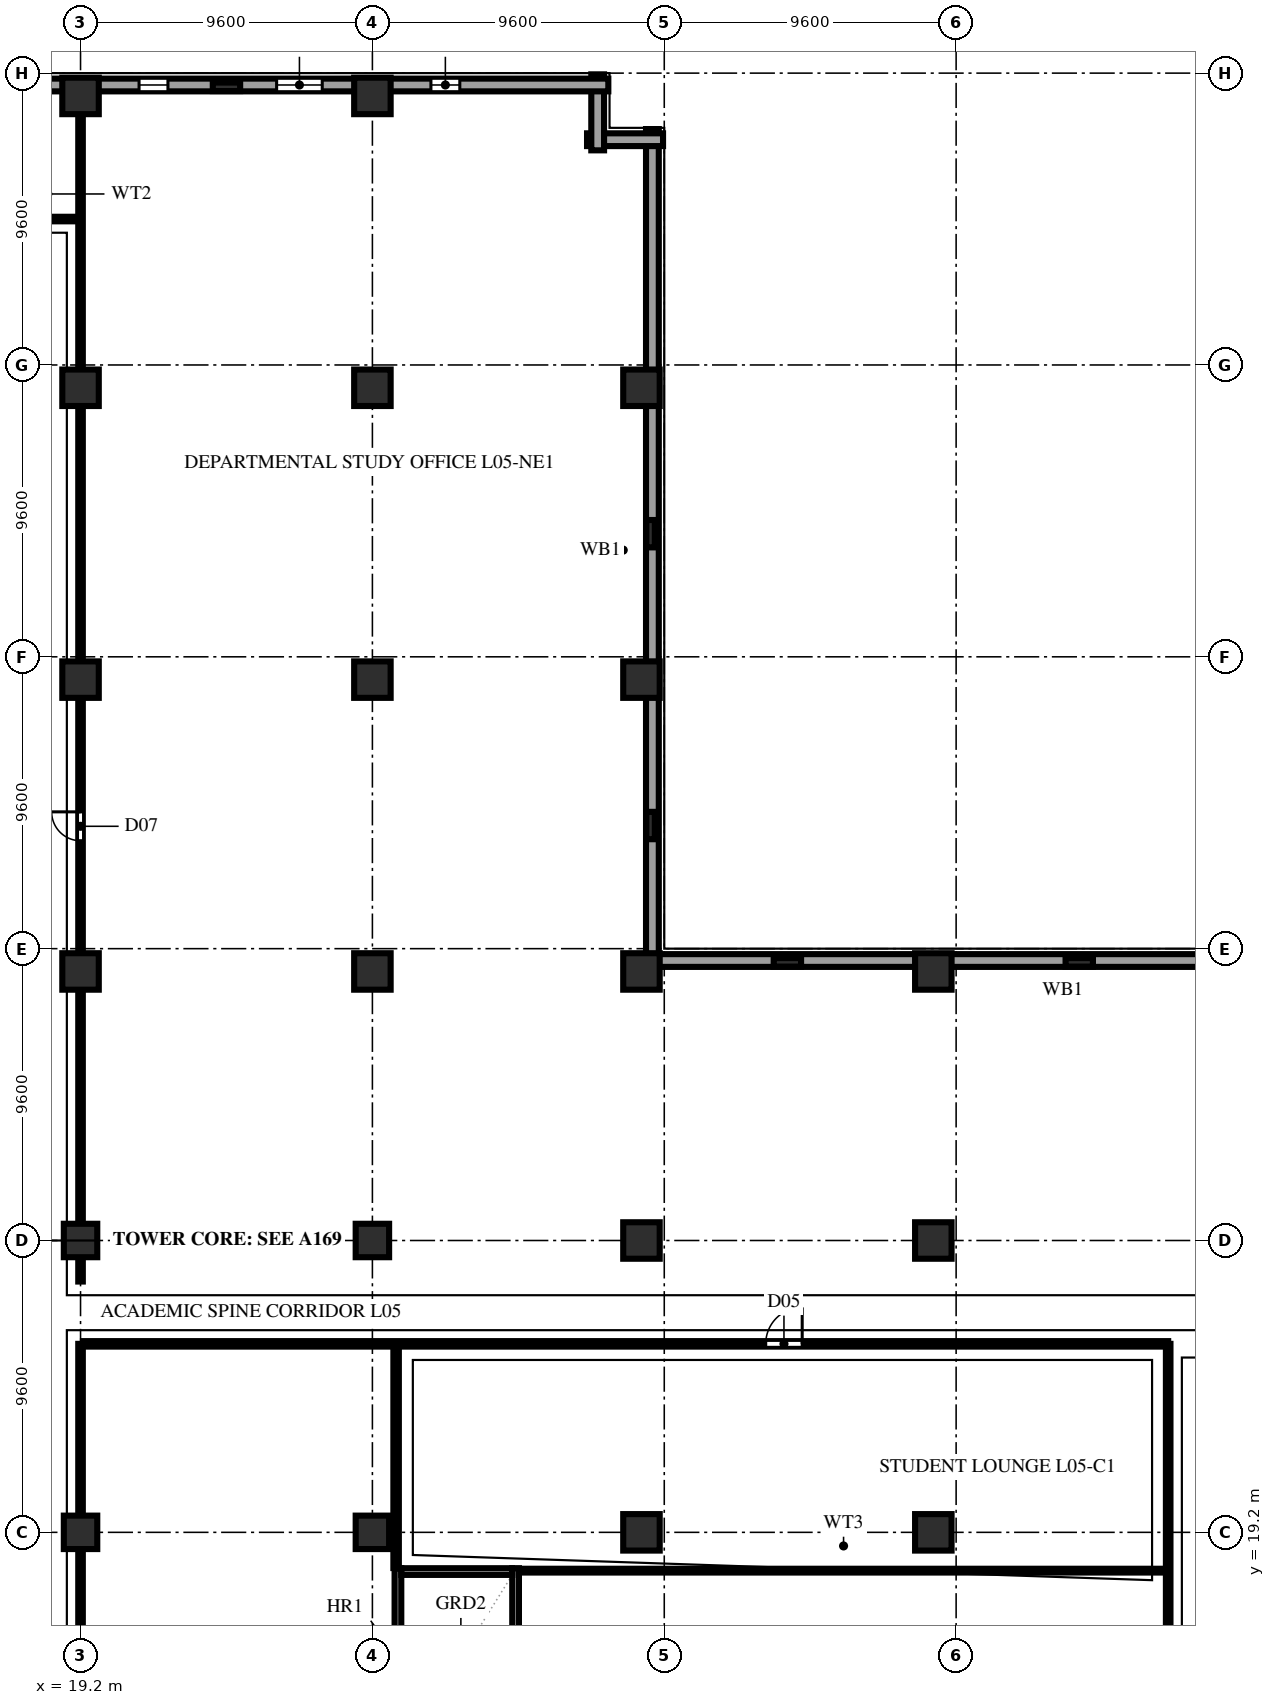
"""IFC4 building model, lengths in metres.
Left out: names, types, materials, properties, quantities, classifications, styles, units other than length and angle.
Written with IfcOpenShell. Run it as: python <this file> out.ifc"""

import sys

from ifc_helpers import new_model, si_unit, direction, frame, frame_2d, origin, origin_2d, place, context, subcontext, project, spatial, rectangle, extrude, element, fill, save


model = new_model("IFC4")
c1 = context("Model", 3, precision=1e-05, world=origin(), true_north=direction((0.0, 1.0)))
c2 = subcontext(c1, "Body", "Model", "MODEL_VIEW")
j1 = project(units=[si_unit("LENGTHUNIT", "METRE"), si_unit("PLANEANGLEUNIT", "RADIAN")], contexts=[c1])
p1 = place(None, origin())
s1 = spatial("IfcSite", under=j1, at=p1, CompositionType="ELEMENT")
p2 = place(p1, origin())
s2 = spatial("IfcBuilding", under=s1, at=p2, CompositionType="ELEMENT")
p3 = place(p2, frame((0.0, 0.0, 24.2)))
s3 = spatial("IfcBuildingStorey", under=s2, at=p3, CompositionType="ELEMENT", Elevation=24.2)
for number, where, z_axis, x_axis in (
    (1, (19.2, 19.2, 0.0), (0.0, 0.0, 1.0), (1.0, 0.0, 0.0)),
    (2, (19.2, 28.8, 0.0), (0.0, 0.0, 1.0), (1.0, 0.0, 0.0)),
):
    element("IfcColumn", number, at=place(p3, frame(where, z_axis=z_axis, x_axis=x_axis)), inside=s3, PredefinedType="COLUMN", context=c2, shape_type="SweptSolid", body=[
        extrude(rectangle(XDim=1.1, YDim=1.1, at=origin_2d()), origin(), (0.0, 0.0, 1.0), 3.8),
    ])
for number, where, z_axis, x_axis in (
    (3, (19.2, 37.65, 0.0), (0.0, 0.0, 1.0), (1.0, 0.0, 0.0)),
    (4, (19.2, 47.25, 0.0), (0.0, 0.0, 1.0), (1.0, 0.0, 0.0)),
    (5, (19.2, 56.85, 0.0), (0.0, 0.0, 1.0), (1.0, 0.0, 0.0)),
    (6, (19.2, 66.45, 0.0), (0.0, 0.0, 1.0), (1.0, 0.0, 0.0)),
):
    element("IfcColumn", number, at=place(p3, frame(where, z_axis=z_axis, x_axis=x_axis)), inside=s3, PredefinedType="COLUMN", context=c2, shape_type="SweptSolid", body=[
        extrude(rectangle(XDim=1.2, YDim=1.2, at=origin_2d()), origin(), (0.0, 0.0, 1.0), 3.8),
    ])
for number, where, z_axis, x_axis in (
    (7, (28.8, 19.2, 0.0), (0.0, 0.0, 1.0), (1.0, 0.0, 0.0)),
    (8, (28.8, 28.8, 0.0), (0.0, 0.0, 1.0), (1.0, 0.0, 0.0)),
):
    element("IfcColumn", number, at=place(p3, frame(where, z_axis=z_axis, x_axis=x_axis)), inside=s3, PredefinedType="COLUMN", context=c2, shape_type="SweptSolid", body=[
        extrude(rectangle(XDim=1.1, YDim=1.1, at=origin_2d()), origin(), (0.0, 0.0, 1.0), 3.8),
    ])
for number, where, z_axis, x_axis in (
    (9, (28.8, 37.65, 0.0), (0.0, 0.0, 1.0), (1.0, 0.0, 0.0)),
    (10, (28.8, 47.25, 0.0), (0.0, 0.0, 1.0), (1.0, 0.0, 0.0)),
    (11, (28.8, 56.85, 0.0), (0.0, 0.0, 1.0), (1.0, 0.0, 0.0)),
    (12, (28.8, 66.45, 0.0), (0.0, 0.0, 1.0), (1.0, 0.0, 0.0)),
    (13, (37.65, 19.2, 0.0), (0.0, 0.0, 1.0), (1.0, 0.0, 0.0)),
    (14, (37.65, 28.8, 0.0), (0.0, 0.0, 1.0), (1.0, 0.0, 0.0)),
    (15, (37.65, 37.65, 0.0), (0.0, 0.0, 1.0), (1.0, 0.0, 0.0)),
    (16, (37.65, 47.25, 0.0), (0.0, 0.0, 1.0), (1.0, 0.0, 0.0)),
    (17, (37.65, 56.85, 0.0), (0.0, 0.0, 1.0), (1.0, 0.0, 0.0)),
    (18, (47.25, 19.2, 0.0), (0.0, 0.0, 1.0), (1.0, 0.0, 0.0)),
    (19, (47.25, 28.8, 0.0), (0.0, 0.0, 1.0), (1.0, 0.0, 0.0)),
    (20, (47.25, 37.65, 0.0), (0.0, 0.0, 1.0), (1.0, 0.0, 0.0)),
):
    element("IfcColumn", number, at=place(p3, frame(where, z_axis=z_axis, x_axis=x_axis)), inside=s3, PredefinedType="COLUMN", context=c2, shape_type="SweptSolid", body=[
        extrude(rectangle(XDim=1.2, YDim=1.2, at=origin_2d()), origin(), (0.0, 0.0, 1.0), 3.8),
    ])
for number, where, z_axis, x_axis in (
    (21, (24.0, 66.75, 0.0), (0.0, 0.0, 1.0), (1.0, 0.0, 0.0)),
    (22, (37.95, 42.45, 0.0), (0.0, 0.0, 1.0), (0.0, 1.0, 0.0)),
    (23, (37.95, 52.05, 0.0), (0.0, 0.0, 1.0), (0.0, 1.0, 0.0)),
    (24, (42.45, 37.95, 0.0), (0.0, 0.0, 1.0), (1.0, 0.0, 0.0)),
    (25, (52.05, 37.95, 0.0), (0.0, 0.0, 1.0), (1.0, 0.0, 0.0)),
):
    element("IfcColumn", number, at=place(p3, frame(where, z_axis=z_axis, x_axis=x_axis)), inside=s3, PredefinedType="PILASTER", context=c2, shape_type="SweptSolid", body=[
        extrude(rectangle(XDim=0.9, YDim=0.28, at=origin_2d()), origin(), (0.0, 0.0, 1.0), 3.8),
    ])
for number, where, z_axis, x_axis in (
    (26, (65.36, 38.01, 0.0), (0.0, 0.0, 1.0), (-1.0, 0.0, 0.0)),
    (27, (38.01, 37.66, 0.0), (0.0, 0.0, 1.0), (0.0, 1.0, 0.0)),
):
    element("IfcWall", number, at=place(p3, frame(where, z_axis=z_axis, x_axis=x_axis)), inside=s3, PredefinedType="SOLIDWALL", context=c2, shape_type="SweptSolid", body=[
        extrude(rectangle(XDim=27.7, YDim=0.42, at=frame_2d((13.85, 0.0))), origin(), (0.0, 0.0, 1.0), 3.54),
    ])
for number, where, z_axis, x_axis in (
    (28, (38.36, 65.01, 0.0), (0.0, 0.0, 1.0), (-1.0, 0.0, 0.0)),
    (29, (36.21, 64.66, 0.0), (0.0, 0.0, 1.0), (0.0, 1.0, 0.0)),
):
    element("IfcWall", number, at=place(p3, frame(where, z_axis=z_axis, x_axis=x_axis)), inside=s3, PredefinedType="SOLIDWALL", context=c2, shape_type="SweptSolid", body=[
        extrude(rectangle(XDim=2.5, YDim=0.42, at=frame_2d((1.25, 0.0))), origin(), (0.0, 0.0, 1.0), 3.54),
    ])
p4 = place(p3, frame((36.56, 66.81, 0.0), z_axis=(0.0, 0.0, 1.0), x_axis=(-1.0, 0.0, 0.0)))
e30 = element("IfcWall", 30, at=p4, inside=s3, PredefinedType="SOLIDWALL", context=c2, shape_type="SweptSolid", body=[
    extrude(rectangle(XDim=34.72, YDim=0.42, at=frame_2d((17.36, 0.0))), origin(), (0.0, 0.0, 1.0), 3.54),
])
p5 = place(p4, frame((4.885, 0.0, 0.9)))
e31 = element("IfcOpeningElement", 31, at=p5, cuts=e30, PredefinedType="OPENING", context=c2, shape_type="SweptSolid", body=[
    extrude(rectangle(XDim=0.95, YDim=1.85, at=frame_2d((0.475, 0.925))), frame((0.0, 0.222, 0.0), z_axis=(0.0, -1.0, 0.0), x_axis=(1.0, 0.0, 0.0)), (0.0, 0.0, 1.0), 0.444),
])
p6 = place(p4, frame((9.41, 0.0, 0.9)))
e32 = element("IfcOpeningElement", 32, at=p6, cuts=e30, PredefinedType="OPENING", context=c2, shape_type="SweptSolid", body=[
    extrude(rectangle(XDim=1.5, YDim=1.85, at=frame_2d((0.75, 0.925))), frame((0.0, 0.222, 0.0), z_axis=(0.0, -1.0, 0.0), x_axis=(1.0, 0.0, 0.0)), (0.0, 0.0, 1.0), 0.444),
])
p7 = place(p4, frame((14.485, 0.0, 0.9)))
e33 = element("IfcOpeningElement", 33, at=p7, cuts=e30, PredefinedType="OPENING", context=c2, shape_type="SweptSolid", body=[
    extrude(rectangle(XDim=0.95, YDim=1.85, at=frame_2d((0.475, 0.925))), frame((0.0, 0.222, 0.0), z_axis=(0.0, -1.0, 0.0), x_axis=(1.0, 0.0, 0.0)), (0.0, 0.0, 1.0), 0.444),
])
for number, where, z_axis, x_axis in (
    (34, (29.64, 9.88, 0.0), (0.0, 0.0, 1.0), (0.0, 1.0, 0.0)),
    (35, (33.51, 9.88, 0.0), (0.0, 0.0, 1.0), (0.0, 1.0, 0.0)),
):
    element("IfcWall", number, at=place(p3, frame(where, z_axis=z_axis, x_axis=x_axis)), inside=s3, PredefinedType="SOLIDWALL", context=c2, shape_type="SweptSolid", body=[
        extrude(rectangle(XDim=8.14, YDim=0.22, at=frame_2d((4.07, 0.0))), origin(), (0.0, 0.0, 1.0), 3.54),
    ])
p8 = place(p3, frame((29.75, 17.91, 0.0), z_axis=(0.0, 0.0, 1.0), x_axis=(1.0, 0.0, 0.0)))
e36 = element("IfcWall", 36, at=p8, inside=s3, PredefinedType="SOLIDWALL", context=c2, shape_type="SweptSolid", body=[
    extrude(rectangle(XDim=3.65, YDim=0.22, at=frame_2d((1.825, 0.0))), origin(), (0.0, 0.0, 1.0), 3.54),
])
p9 = place(p3, frame((17.05, 62.4, 0.0), z_axis=(0.0, 0.0, 1.0), x_axis=(1.0, 0.0, 0.0)))
e37 = element("IfcWall", 37, at=p9, inside=s3, PredefinedType="PARTITIONING", context=c2, shape_type="SweptSolid", body=[
    extrude(rectangle(XDim=2.15, YDim=0.15, at=frame_2d((1.075, 0.0))), origin(), (0.0, 0.0, 1.0), 3.54),
])
p10 = place(p3, frame((19.2, 9.55, 0.0), z_axis=(0.0, 0.0, 1.0), x_axis=(0.0, 1.0, 0.0)))
e38 = element("IfcWall", 38, at=p10, inside=s3, PredefinedType="PARTITIONING", context=c2, shape_type="SweptSolid", body=[
    extrude(rectangle(XDim=15.85, YDim=0.15, at=frame_2d((7.925, 0.0))), origin(), (0.0, 0.0, 1.0), 2.923),
])
p11 = place(p10, frame((4.25, 0.0, 0.0)))
e39 = element("IfcOpeningElement", 39, at=p11, cuts=e38, PredefinedType="OPENING", context=c2, shape_type="SweptSolid", body=[
    extrude(rectangle(XDim=1.0, YDim=2.2, at=frame_2d((0.5, 1.1))), frame((0.0, 0.087, 0.0), z_axis=(0.0, -1.0, 0.0), x_axis=(1.0, 0.0, 0.0)), (0.0, 0.0, 1.0), 0.174),
])
p12 = place(p3, frame((29.58, 18.025, 0.0), z_axis=(0.0, 0.0, 1.0), x_axis=(0.0, 1.0, 0.0)))
e40 = element("IfcWall", 40, at=p12, inside=s3, PredefinedType="PARTITIONING", context=c2, shape_type="SweptSolid", body=[
    extrude(rectangle(XDim=7.28, YDim=0.18, at=frame_2d((3.64, 0.0))), origin(), (0.0, 0.0, 1.0), 3.54),
])
p13 = place(p3, frame((19.28, 25.4, 0.0), z_axis=(0.0, 0.0, 1.0), x_axis=(1.0, 0.0, 0.0)))
e41 = element("IfcWall", 41, at=p13, inside=s3, PredefinedType="PARTITIONING", context=c2, shape_type="SweptSolid", body=[
    extrude(rectangle(XDim=35.695, YDim=0.18, at=frame_2d((17.848, 0.0))), origin(), (0.0, 0.0, 1.0), 3.54),
])
p14 = place(p13, frame((22.457, 0.0, 0.0)))
e42 = element("IfcOpeningElement", 42, at=p14, cuts=e41, PredefinedType="OPENING", context=c2, shape_type="SweptSolid", body=[
    extrude(rectangle(XDim=1.2, YDim=2.2, at=frame_2d((0.6, 1.1))), frame((0.0, 0.102, 0.0), z_axis=(0.0, -1.0, 0.0), x_axis=(1.0, 0.0, 0.0)), (0.0, 0.0, 1.0), 0.204),
])
p15 = place(p3, frame((33.62, 17.94, 0.0), z_axis=(0.0, 0.0, 1.0), x_axis=(1.0, 0.0, 0.0)))
e43 = element("IfcWall", 43, at=p15, inside=s3, PredefinedType="PARTITIONING", context=c2, shape_type="SweptSolid", body=[
    extrude(rectangle(XDim=21.355, YDim=0.125, at=frame_2d((10.677, 0.0))), origin(), (0.0, 0.0, 1.0), 3.54),
])
p16 = place(p3, frame((54.975, 9.55, 0.0), z_axis=(0.0, 0.0, 1.0), x_axis=(0.0, 1.0, 0.0)))
e44 = element("IfcWall", 44, at=p16, inside=s3, PredefinedType="PARTITIONING", context=c2, shape_type="SweptSolid", body=[
    extrude(rectangle(XDim=15.85, YDim=0.15, at=frame_2d((7.925, 0.0))), origin(), (0.0, 0.0, 1.0), 3.54),
])
p17 = place(p3, frame((19.2, 27.45, 0.0), z_axis=(0.0, 0.0, 1.0), x_axis=(0.0, 1.0, 0.0)))
e45 = element("IfcWall", 45, at=p17, inside=s3, PredefinedType="PARTITIONING", context=c2, shape_type="SweptSolid", body=[
    extrude(rectangle(XDim=39.0, YDim=0.15, at=frame_2d((19.5, 0.0))), origin(), (0.0, 0.0, 1.0), 2.923),
])
p18 = place(p17, frame((14.5, 0.0, 0.0)))
e46 = element("IfcOpeningElement", 46, at=p18, cuts=e45, PredefinedType="OPENING", context=c2, shape_type="SweptSolid", body=[
    extrude(rectangle(XDim=0.95, YDim=2.15, at=frame_2d((0.475, 1.075))), frame((0.0, 0.087, 0.0), z_axis=(0.0, -1.0, 0.0), x_axis=(1.0, 0.0, 0.0)), (0.0, 0.0, 1.0), 0.174),
])
p19 = place(p3, frame((19.2, 66.45, 0.0), z_axis=(0.0, 0.0, 1.0), x_axis=(0.0, 1.0, 0.0)))
e47 = element("IfcWall", 47, at=p19, inside=s3, PredefinedType="PARTITIONING", context=c2, shape_type="SweptSolid", body=[
    extrude(rectangle(XDim=0.53, YDim=0.15, at=frame_2d((0.265, 0.0))), origin(), (0.0, 0.0, 1.0), 3.54),
])
p20 = place(p5, origin())
e48 = element("IfcWindow", 48, at=p20, inside=s3, PartitioningType="SINGLE_PANEL", PredefinedType="WINDOW", context=c2, shape_type="SweptSolid", body=[
    extrude(rectangle(XDim=0.95, YDim=1.85, at=frame_2d((0.475, 0.925))), frame((0.0, 0.11, 0.0), z_axis=(0.0, -1.0, 0.0), x_axis=(1.0, 0.0, 0.0)), (0.0, 0.0, 1.0), 0.06),
])
fill(e31, e48)
p21 = place(p6, origin())
e49 = element("IfcWindow", 49, at=p21, inside=s3, PartitioningType="DOUBLE_PANEL_VERTICAL", PredefinedType="WINDOW", context=c2, shape_type="SweptSolid", body=[
    extrude(rectangle(XDim=1.5, YDim=1.85, at=frame_2d((0.75, 0.925))), frame((0.0, 0.11, 0.0), z_axis=(0.0, -1.0, 0.0), x_axis=(1.0, 0.0, 0.0)), (0.0, 0.0, 1.0), 0.06),
])
fill(e32, e49)
p22 = place(p7, origin())
e50 = element("IfcWindow", 50, at=p22, inside=s3, PartitioningType="SINGLE_PANEL", PredefinedType="WINDOW", context=c2, shape_type="SweptSolid", body=[
    extrude(rectangle(XDim=0.95, YDim=1.85, at=frame_2d((0.475, 0.925))), frame((0.0, 0.11, 0.0), z_axis=(0.0, -1.0, 0.0), x_axis=(1.0, 0.0, 0.0)), (0.0, 0.0, 1.0), 0.06),
])
fill(e33, e50)
p23 = place(p14, origin())
e51 = element("IfcDoor", 51, at=p23, inside=s3, OperationType="SINGLE_SWING_RIGHT", PredefinedType="DOOR", context=c2, shape_type="SweptSolid", body=[
    extrude(rectangle(XDim=1.2, YDim=2.2, at=frame_2d((0.6, 1.1))), frame((0.0, 0.025, 0.0), z_axis=(0.0, -1.0, 0.0), x_axis=(1.0, 0.0, 0.0)), (0.0, 0.0, 1.0), 0.05),
])
fill(e42, e51)
p24 = place(p18, origin())
e52 = element("IfcDoor", 52, at=p24, inside=s3, OperationType="SINGLE_SWING_RIGHT", PredefinedType="DOOR", context=c2, shape_type="SweptSolid", body=[
    extrude(rectangle(XDim=0.95, YDim=2.15, at=frame_2d((0.475, 1.075))), frame((0.0, 0.025, 0.0), z_axis=(0.0, -1.0, 0.0), x_axis=(1.0, 0.0, 0.0)), (0.0, 0.0, 1.0), 0.05),
])
fill(e46, e52)
save(model, sys.argv[1])
